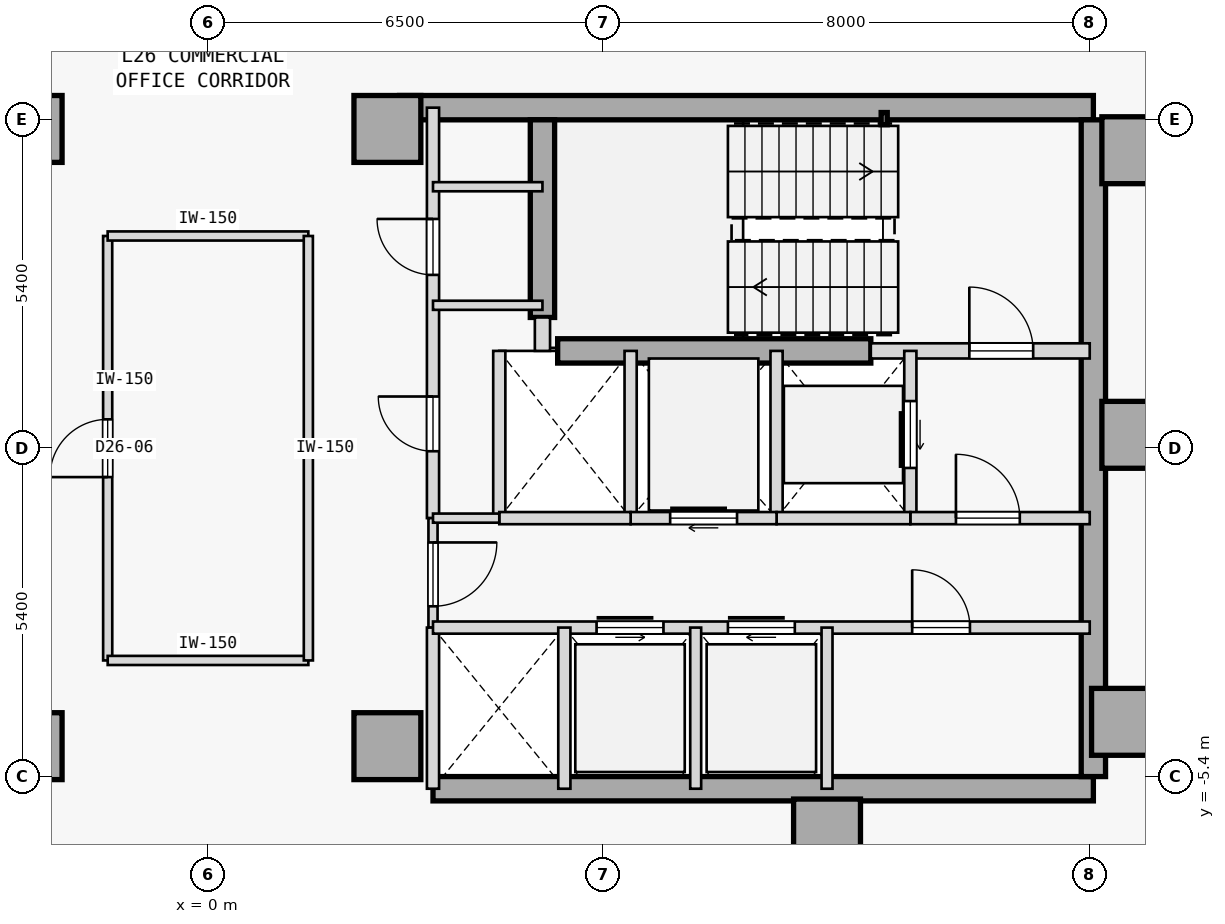
"""IFC4 building model, lengths in metres.
Left out: names, types, materials, properties, quantities, classifications, styles, units other than length and angle.
Written with IfcOpenShell. Run it as: python <this file> out.ifc"""

import sys

from ifc_helpers import new_model, si_unit, direction, frame, frame_2d, origin, origin_2d, place, context, subcontext, project, spatial, rectangle, hollow_rectangle, extrude, element, fill, save


model = new_model("IFC4")
c1 = context("Model", 3, precision=1e-05, world=origin(), true_north=direction((0.0, 1.0)))
c2 = subcontext(c1, "Body", "Model", "MODEL_VIEW")
j1 = project(units=[si_unit("LENGTHUNIT", "METRE"), si_unit("PLANEANGLEUNIT", "RADIAN")], contexts=[c1])
p1 = place(None, origin())
s1 = spatial("IfcSite", under=j1, at=p1, CompositionType="ELEMENT")
p2 = place(p1, origin())
s2 = spatial("IfcBuilding", under=s1, at=p2, CompositionType="ELEMENT")
p3 = place(p2, frame((0.0, 0.0, 105.9)))
s3 = spatial("IfcBuildingStorey", under=s2, at=p3, CompositionType="ELEMENT", Elevation=105.9)
for number, where, z_axis, x_axis in (
    (1, (-2.95, -4.9, 0.0), (0.0, 0.0, 1.0), (1.0, 0.0, 0.0)),
    (2, (-2.95, 5.25, 0.0), (0.0, 0.0, 1.0), (1.0, 0.0, 0.0)),
    (3, (15.25, 4.9, 0.0), (0.0, 0.0, 1.0), (1.0, 0.0, 0.0)),
    (4, (15.25, 0.22, 0.0), (0.0, 0.0, 1.0), (1.0, 0.0, 0.0)),
    (5, (15.08, -4.5, 0.0), (0.0, 0.0, 1.0), (1.0, 0.0, 0.0)),
    (6, (10.18, -6.32, 0.0), (0.0, 0.0, 1.0), (1.0, 0.0, 0.0)),
    (7, (2.95, -4.9, 0.0), (0.0, 0.0, 1.0), (1.0, 0.0, 0.0)),
    (8, (2.95, 5.25, 0.0), (0.0, 0.0, 1.0), (1.0, 0.0, 0.0)),
):
    element("IfcColumn", number, at=place(p3, frame(where, z_axis=z_axis, x_axis=x_axis)), inside=s3, PredefinedType="COLUMN", context=c2, shape_type="SweptSolid", body=[
        extrude(rectangle(XDim=1.1, YDim=1.1, at=origin_2d()), origin(), (0.0, 0.0, 1.0), 3.7),
    ])
p4 = place(p3, frame((3.15, 5.6, 0.0), z_axis=(0.0, 0.0, 1.0), x_axis=(1.0, 0.0, 0.0)))
e9 = element("IfcWall", 9, at=p4, inside=s3, PredefinedType="SHEAR", context=c2, shape_type="SweptSolid", body=[
    extrude(rectangle(XDim=11.41, YDim=0.4, at=frame_2d((5.705, 0.0))), origin(), (0.0, 0.0, 1.0), 3.475),
])
p5 = place(p3, frame((3.7, -5.6, 0.0), z_axis=(0.0, 0.0, 1.0), x_axis=(1.0, 0.0, 0.0)))
e10 = element("IfcWall", 10, at=p5, inside=s3, PredefinedType="SHEAR", context=c2, shape_type="SweptSolid", body=[
    extrude(rectangle(XDim=10.86, YDim=0.4, at=frame_2d((5.43, 0.0))), origin(), (0.0, 0.0, 1.0), 3.475),
])
p6 = place(p3, frame((14.56, -5.4, 0.0), z_axis=(0.0, 0.0, 1.0), x_axis=(0.0, 1.0, 0.0)))
e11 = element("IfcWall", 11, at=p6, inside=s3, PredefinedType="SHEAR", context=c2, shape_type="SweptSolid", body=[
    extrude(rectangle(XDim=10.8, YDim=0.4, at=frame_2d((5.4, 0.0))), origin(), (0.0, 0.0, 1.0), 3.475),
])
p7 = place(p3, frame((5.5, 2.15, 0.0), z_axis=(0.0, 0.0, 1.0), x_axis=(0.0, 1.0, 0.0)))
e12 = element("IfcWall", 12, at=p7, inside=s3, PredefinedType="SHEAR", context=c2, shape_type="SweptSolid", body=[
    extrude(rectangle(XDim=3.25, YDim=0.4, at=frame_2d((1.625, 0.0))), origin(), (0.0, 0.0, 1.0), 3.475),
])
p8 = place(p3, frame((5.75, 1.6, 0.0), z_axis=(0.0, 0.0, 1.0), x_axis=(1.0, 0.0, 0.0)))
e13 = element("IfcWall", 13, at=p8, inside=s3, PredefinedType="SHEAR", context=c2, shape_type="SweptSolid", body=[
    extrude(rectangle(XDim=5.15, YDim=0.4, at=frame_2d((2.575, 0.0))), origin(), (0.0, 0.0, 1.0), 3.475),
])
p9 = place(p3, frame((11.12, 5.42, 0.0), z_axis=(0.0, 0.0, 1.0), x_axis=(1.0, 0.0, 0.0)))
e14 = element("IfcColumn", 14, at=p9, inside=s3, PredefinedType="COLUMN", context=c2, shape_type="SweptSolid", body=[
    extrude(hollow_rectangle(XDim=0.1, YDim=0.2, WallThickness=0.008, at=origin_2d()), origin(), (0.0, 0.0, 1.0), 3.7),
])
p10 = place(p3, frame((10.9, 1.6, 0.0), z_axis=(0.0, 0.0, 1.0), x_axis=(1.0, 0.0, 0.0)))
e15 = element("IfcWall", 15, at=p10, inside=s3, PredefinedType="STANDARD", context=c2, shape_type="SweptSolid", body=[
    extrude(rectangle(XDim=3.6, YDim=0.25, at=frame_2d((1.8, 0.0))), origin(), (0.0, 0.0, 1.0), 3.475),
])
p11 = place(p10, frame((1.62, 0.0, 0.0)))
e16 = element("IfcOpeningElement", 16, at=p11, cuts=e15, PredefinedType="OPENING", context=c2, shape_type="SweptSolid", body=[
    extrude(rectangle(XDim=1.05, YDim=2.15, at=frame_2d((0.525, 1.075))), frame((0.0, 0.135, 0.0), z_axis=(0.0, -1.0, 0.0), x_axis=(1.0, 0.0, 0.0)), (0.0, 0.0, 1.0), 0.27),
])
p12 = place(p3, frame((5.5, 1.6, 0.0), z_axis=(0.0, 0.0, 1.0), x_axis=(0.0, 1.0, 0.0)))
e17 = element("IfcWall", 17, at=p12, inside=s3, PredefinedType="STANDARD", context=c2, shape_type="SweptSolid", body=[
    extrude(rectangle(XDim=0.55, YDim=0.25, at=frame_2d((0.275, 0.0))), origin(), (0.0, 0.0, 1.0), 3.475),
])
p13 = place(p3, frame((3.7, -1.15, 0.0), z_axis=(0.0, 0.0, 1.0), x_axis=(0.0, 1.0, 0.0)))
e18 = element("IfcWall", 18, at=p13, inside=s3, PredefinedType="STANDARD", context=c2, shape_type="SweptSolid", body=[
    extrude(rectangle(XDim=6.75, YDim=0.2, at=frame_2d((3.375, 0.0))), origin(), (0.0, 0.0, 1.0), 3.475),
])
p14 = place(p13, frame((1.1, 0.0, 0.0)))
e19 = element("IfcOpeningElement", 19, at=p14, cuts=e18, PredefinedType="OPENING", context=c2, shape_type="SweptSolid", body=[
    extrude(rectangle(XDim=0.9, YDim=2.15, at=frame_2d((0.45, 1.075))), frame((0.0, 0.11, 0.0), z_axis=(0.0, -1.0, 0.0), x_axis=(1.0, 0.0, 0.0)), (0.0, 0.0, 1.0), 0.22),
])
p15 = place(p13, frame((4.0, 0.0, 0.0)))
e20 = element("IfcOpeningElement", 20, at=p15, cuts=e18, PredefinedType="OPENING", context=c2, shape_type="SweptSolid", body=[
    extrude(rectangle(XDim=0.92, YDim=2.15, at=frame_2d((0.46, 1.075))), frame((0.0, 0.11, 0.0), z_axis=(0.0, -1.0, 0.0), x_axis=(1.0, 0.0, 0.0)), (0.0, 0.0, 1.0), 0.22),
])
p16 = place(p3, frame((3.7, -2.95, 0.0), z_axis=(0.0, 0.0, 1.0), x_axis=(0.0, 1.0, 0.0)))
e21 = element("IfcWall", 21, at=p16, inside=s3, PredefinedType="PARTITIONING", context=c2, shape_type="SweptSolid", body=[
    extrude(rectangle(XDim=1.8, YDim=0.15, at=frame_2d((0.9, 0.0))), origin(), (0.0, 0.0, 1.0), 3.475),
])
p17 = place(p16, frame((0.35, 0.0, 0.0)))
e22 = element("IfcOpeningElement", 22, at=p17, cuts=e21, PredefinedType="OPENING", context=c2, shape_type="SweptSolid", body=[
    extrude(rectangle(XDim=1.05, YDim=2.18, at=frame_2d((0.525, 1.09))), frame((0.0, 0.085, 0.0), z_axis=(0.0, -1.0, 0.0), x_axis=(1.0, 0.0, 0.0)), (0.0, 0.0, 1.0), 0.17),
])
p18 = place(p3, frame((3.7, -5.6, 0.0), z_axis=(0.0, 0.0, 1.0), x_axis=(0.0, 1.0, 0.0)))
e23 = element("IfcWall", 23, at=p18, inside=s3, PredefinedType="STANDARD", context=c2, shape_type="SweptSolid", body=[
    extrude(rectangle(XDim=2.65, YDim=0.2, at=frame_2d((1.325, 0.0))), origin(), (0.0, 0.0, 1.0), 3.475),
])
p19 = place(p3, frame((11.55, -1.15, 0.0), z_axis=(0.0, 0.0, 1.0), x_axis=(0.0, 1.0, 0.0)))
e24 = element("IfcWall", 24, at=p19, inside=s3, PredefinedType="STANDARD", context=c2, shape_type="SweptSolid", body=[
    extrude(rectangle(XDim=2.75, YDim=0.2, at=frame_2d((1.375, 0.0))), origin(), (0.0, 0.0, 1.0), 3.475),
])
p20 = place(p19, frame((0.825, 0.0, 0.0)))
e25 = element("IfcOpeningElement", 25, at=p20, cuts=e24, PredefinedType="OPENING", context=c2, shape_type="SweptSolid", body=[
    extrude(rectangle(XDim=1.1, YDim=2.15, at=frame_2d((0.55, 1.075))), frame((0.0, 0.11, 0.0), z_axis=(0.0, -1.0, 0.0), x_axis=(1.0, 0.0, 0.0)), (0.0, 0.0, 1.0), 0.22),
])
p21 = place(p3, frame((9.35, -1.15, 0.0), z_axis=(0.0, 0.0, 1.0), x_axis=(0.0, 1.0, 0.0)))
e26 = element("IfcWall", 26, at=p21, inside=s3, PredefinedType="STANDARD", context=c2, shape_type="SweptSolid", body=[
    extrude(rectangle(XDim=2.75, YDim=0.2, at=frame_2d((1.375, 0.0))), origin(), (0.0, 0.0, 1.0), 3.475),
])
p22 = place(p3, frame((11.55, -1.15, 0.0), z_axis=(0.0, 0.0, 1.0), x_axis=(1.0, 0.0, 0.0)))
e27 = element("IfcWall", 27, at=p22, inside=s3, PredefinedType="STANDARD", context=c2, shape_type="SweptSolid", body=[
    extrude(rectangle(XDim=2.95, YDim=0.2, at=frame_2d((1.475, 0.0))), origin(), (0.0, 0.0, 1.0), 3.475),
])
p23 = place(p22, frame((0.75, 0.0, 0.0)))
e28 = element("IfcOpeningElement", 28, at=p23, cuts=e27, PredefinedType="OPENING", context=c2, shape_type="SweptSolid", body=[
    extrude(rectangle(XDim=1.05, YDim=2.18, at=frame_2d((0.525, 1.09))), frame((0.0, 0.11, 0.0), z_axis=(0.0, -1.0, 0.0), x_axis=(1.0, 0.0, 0.0)), (0.0, 0.0, 1.0), 0.22),
])
p24 = place(p3, frame((9.35, -1.15, 0.0), z_axis=(0.0, 0.0, 1.0), x_axis=(1.0, 0.0, 0.0)))
e29 = element("IfcWall", 29, at=p24, inside=s3, PredefinedType="STANDARD", context=c2, shape_type="SweptSolid", body=[
    extrude(rectangle(XDim=2.2, YDim=0.2, at=frame_2d((1.1, 0.0))), origin(), (0.0, 0.0, 1.0), 3.475),
])
p25 = place(p3, frame((6.95, -1.15, 0.0), z_axis=(0.0, 0.0, 1.0), x_axis=(0.0, 1.0, 0.0)))
e30 = element("IfcWall", 30, at=p25, inside=s3, PredefinedType="STANDARD", context=c2, shape_type="SweptSolid", body=[
    extrude(rectangle(XDim=2.75, YDim=0.2, at=frame_2d((1.375, 0.0))), origin(), (0.0, 0.0, 1.0), 3.475),
])
p26 = place(p3, frame((6.95, -1.15, 0.0), z_axis=(0.0, 0.0, 1.0), x_axis=(1.0, 0.0, 0.0)))
e31 = element("IfcWall", 31, at=p26, inside=s3, PredefinedType="STANDARD", context=c2, shape_type="SweptSolid", body=[
    extrude(rectangle(XDim=2.4, YDim=0.2, at=frame_2d((1.2, 0.0))), origin(), (0.0, 0.0, 1.0), 3.475),
])
p27 = place(p26, frame((0.65, 0.0, 0.0)))
e32 = element("IfcOpeningElement", 32, at=p27, cuts=e31, PredefinedType="OPENING", context=c2, shape_type="SweptSolid", body=[
    extrude(rectangle(XDim=1.1, YDim=2.15, at=frame_2d((0.55, 1.075))), frame((0.0, 0.11, 0.0), z_axis=(0.0, -1.0, 0.0), x_axis=(1.0, 0.0, 0.0)), (0.0, 0.0, 1.0), 0.22),
])
p28 = place(p3, frame((4.79, -1.15, 0.0), z_axis=(0.0, 0.0, 1.0), x_axis=(0.0, 1.0, 0.0)))
e33 = element("IfcWall", 33, at=p28, inside=s3, PredefinedType="STANDARD", context=c2, shape_type="SweptSolid", body=[
    extrude(rectangle(XDim=2.75, YDim=0.2, at=frame_2d((1.375, 0.0))), origin(), (0.0, 0.0, 1.0), 3.475),
])
p29 = place(p3, frame((4.79, -1.15, 0.0), z_axis=(0.0, 0.0, 1.0), x_axis=(1.0, 0.0, 0.0)))
e34 = element("IfcWall", 34, at=p29, inside=s3, PredefinedType="STANDARD", context=c2, shape_type="SweptSolid", body=[
    extrude(rectangle(XDim=2.16, YDim=0.2, at=frame_2d((1.08, 0.0))), origin(), (0.0, 0.0, 1.0), 3.475),
])
p30 = place(p3, frame((3.7, -1.15, 0.0), z_axis=(0.0, 0.0, 1.0), x_axis=(1.0, 0.0, 0.0)))
e35 = element("IfcWall", 35, at=p30, inside=s3, PredefinedType="PARTITIONING", context=c2, shape_type="SweptSolid", body=[
    extrude(rectangle(XDim=1.09, YDim=0.15, at=frame_2d((0.545, 0.0))), origin(), (0.0, 0.0, 1.0), 3.475),
])
p31 = place(p3, frame((3.7, -2.95, 0.0), z_axis=(0.0, 0.0, 1.0), x_axis=(1.0, 0.0, 0.0)))
e36 = element("IfcWall", 36, at=p31, inside=s3, PredefinedType="STANDARD", context=c2, shape_type="SweptSolid", body=[
    extrude(rectangle(XDim=10.8, YDim=0.2, at=frame_2d((5.4, 0.0))), origin(), (0.0, 0.0, 1.0), 3.475),
])
p32 = place(p31, frame((2.69, 0.0, 0.0)))
e37 = element("IfcOpeningElement", 37, at=p32, cuts=e36, PredefinedType="OPENING", context=c2, shape_type="SweptSolid", body=[
    extrude(rectangle(XDim=1.1, YDim=2.15, at=frame_2d((0.55, 1.075))), frame((0.0, 0.11, 0.0), z_axis=(0.0, -1.0, 0.0), x_axis=(1.0, 0.0, 0.0)), (0.0, 0.0, 1.0), 0.22),
])
p33 = place(p31, frame((4.85, 0.0, 0.0)))
e38 = element("IfcOpeningElement", 38, at=p33, cuts=e36, PredefinedType="OPENING", context=c2, shape_type="SweptSolid", body=[
    extrude(rectangle(XDim=1.1, YDim=2.15, at=frame_2d((0.55, 1.075))), frame((0.0, 0.11, 0.0), z_axis=(0.0, -1.0, 0.0), x_axis=(1.0, 0.0, 0.0)), (0.0, 0.0, 1.0), 0.22),
])
p34 = place(p31, frame((7.88, 0.0, 0.0)))
e39 = element("IfcOpeningElement", 39, at=p34, cuts=e36, PredefinedType="OPENING", context=c2, shape_type="SweptSolid", body=[
    extrude(rectangle(XDim=0.95, YDim=2.15, at=frame_2d((0.475, 1.075))), frame((0.0, 0.11, 0.0), z_axis=(0.0, -1.0, 0.0), x_axis=(1.0, 0.0, 0.0)), (0.0, 0.0, 1.0), 0.22),
])
p35 = place(p3, frame((5.86, -5.6, 0.0), z_axis=(0.0, 0.0, 1.0), x_axis=(0.0, 1.0, 0.0)))
e40 = element("IfcWall", 40, at=p35, inside=s3, PredefinedType="STANDARD", context=c2, shape_type="SweptSolid", body=[
    extrude(rectangle(XDim=2.65, YDim=0.2, at=frame_2d((1.325, 0.0))), origin(), (0.0, 0.0, 1.0), 3.475),
])
for number, where, z_axis, x_axis in (
    (41, (10.18, -5.6, 0.0), (0.0, 0.0, 1.0), (0.0, 1.0, 0.0)),
    (42, (8.02, -5.6, 0.0), (0.0, 0.0, 1.0), (0.0, 1.0, 0.0)),
):
    element("IfcWall", number, at=place(p3, frame(where, z_axis=z_axis, x_axis=x_axis)), inside=s3, PredefinedType="STANDARD", context=c2, shape_type="SweptSolid", body=[
        extrude(rectangle(XDim=2.65, YDim=0.18, at=frame_2d((1.325, 0.0))), origin(), (0.0, 0.0, 1.0), 3.475),
    ])
for number, where, z_axis, x_axis in (
    (43, (3.7, 4.3, 0.0), (0.0, 0.0, 1.0), (1.0, 0.0, 0.0)),
    (44, (3.7, 2.35, 0.0), (0.0, 0.0, 1.0), (1.0, 0.0, 0.0)),
):
    element("IfcWall", number, at=place(p3, frame(where, z_axis=z_axis, x_axis=x_axis)), inside=s3, PredefinedType="PARTITIONING", context=c2, shape_type="SweptSolid", body=[
        extrude(rectangle(XDim=1.8, YDim=0.15, at=frame_2d((0.9, 0.0))), origin(), (0.0, 0.0, 1.0), 3.475),
    ])
p36 = place(p3, frame((-1.65, -3.49, 0.0), z_axis=(0.0, 0.0, 1.0), x_axis=(-0.000104928124, 0.999999994495, 0.0)))
e45 = element("IfcWall", 45, at=p36, inside=s3, PredefinedType="PARTITIONING", context=c2, shape_type="SweptSolid", body=[
    extrude(rectangle(XDim=6.98, YDim=0.15, at=frame_2d((3.49, 0.0))), origin(), (0.0, 0.0, 1.0), 3.475),
])
p37 = place(p36, frame((3.015, 0.0, 0.0)))
e46 = element("IfcOpeningElement", 46, at=p37, cuts=e45, PredefinedType="OPENING", context=c2, shape_type="SweptSolid", body=[
    extrude(rectangle(XDim=0.95, YDim=2.15, at=frame_2d((0.475, 1.075))), frame((0.0, 0.085, 0.0), z_axis=(0.0, -1.0, 0.0), x_axis=(1.0, 0.0, 0.0)), (0.0, 0.0, 1.0), 0.17),
])
p38 = place(p3, frame((-1.65, -3.49, 0.0), z_axis=(0.0, 0.0, 1.0), x_axis=(1.0, 0.0, 0.0)))
e47 = element("IfcWall", 47, at=p38, inside=s3, PredefinedType="PARTITIONING", context=c2, shape_type="SweptSolid", body=[
    extrude(rectangle(XDim=3.3, YDim=0.15, at=frame_2d((1.65, 0.0))), origin(), (0.0, 0.0, 1.0), 3.475),
])
p39 = place(p3, frame((-1.65, 3.49, 0.0), z_axis=(0.0, 0.0, 1.0), x_axis=(1.0, 0.0, 0.0)))
e48 = element("IfcWall", 48, at=p39, inside=s3, PredefinedType="PARTITIONING", context=c2, shape_type="SweptSolid", body=[
    extrude(rectangle(XDim=3.3, YDim=0.15, at=frame_2d((1.65, 0.0))), origin(), (0.0, 0.0, 1.0), 3.475),
])
p40 = place(p3, frame((1.65, -3.49, 0.0), z_axis=(0.0, 0.0, 1.0), x_axis=(-6.9952083e-05, 0.999999997553, 0.0)))
e49 = element("IfcWall", 49, at=p40, inside=s3, PredefinedType="PARTITIONING", context=c2, shape_type="SweptSolid", body=[
    extrude(rectangle(XDim=6.98, YDim=0.15, at=frame_2d((3.49, 0.0))), origin(), (0.0, 0.0, 1.0), 3.475),
])
p41 = place(p11, origin())
e50 = element("IfcDoor", 50, at=p41, inside=s3, OperationType="SINGLE_SWING_LEFT", PredefinedType="DOOR", context=c2, shape_type="SweptSolid", body=[
    extrude(rectangle(XDim=1.05, YDim=2.15, at=frame_2d((0.525, 1.075))), frame((0.0, 0.025, 0.0), z_axis=(0.0, -1.0, 0.0), x_axis=(1.0, 0.0, 0.0)), (0.0, 0.0, 1.0), 0.05),
])
fill(e16, e50)
p42 = place(p23, origin())
e51 = element("IfcDoor", 51, at=p42, inside=s3, OperationType="SINGLE_SWING_LEFT", PredefinedType="DOOR", context=c2, shape_type="SweptSolid", body=[
    extrude(rectangle(XDim=1.05, YDim=2.18, at=frame_2d((0.525, 1.09))), frame((0.0, 0.025, 0.0), z_axis=(0.0, -1.0, 0.0), x_axis=(1.0, 0.0, 0.0)), (0.0, 0.0, 1.0), 0.05),
])
fill(e28, e51)
p43 = place(p17, frame((1.05, 0.0, 0.0), z_axis=(0.0, 0.0, 1.0), x_axis=(-1.0, 0.0, 0.0)))
e52 = element("IfcDoor", 52, at=p43, inside=s3, OperationType="SINGLE_SWING_RIGHT", PredefinedType="DOOR", context=c2, shape_type="SweptSolid", body=[
    extrude(rectangle(XDim=1.05, YDim=2.18, at=frame_2d((0.525, 1.09))), frame((0.0, 0.025, 0.0), z_axis=(0.0, -1.0, 0.0), x_axis=(1.0, 0.0, 0.0)), (0.0, 0.0, 1.0), 0.05),
])
fill(e22, e52)
p44 = place(p20, origin())
e53 = element("IfcDoor", 53, at=p44, inside=s3, OperationType="SLIDING_TO_RIGHT", PredefinedType="DOOR", context=c2, shape_type="SweptSolid", body=[
    extrude(rectangle(XDim=1.1, YDim=2.15, at=frame_2d((0.55, 1.075))), frame((0.0, 0.025, 0.0), z_axis=(0.0, -1.0, 0.0), x_axis=(1.0, 0.0, 0.0)), (0.0, 0.0, 1.0), 0.05),
])
fill(e25, e53)
p45 = place(p27, origin())
e54 = element("IfcDoor", 54, at=p45, inside=s3, OperationType="SLIDING_TO_RIGHT", PredefinedType="DOOR", context=c2, shape_type="SweptSolid", body=[
    extrude(rectangle(XDim=1.1, YDim=2.15, at=frame_2d((0.55, 1.075))), frame((0.0, 0.025, 0.0), z_axis=(0.0, -1.0, 0.0), x_axis=(1.0, 0.0, 0.0)), (0.0, 0.0, 1.0), 0.05),
])
fill(e32, e54)
p46 = place(p32, origin())
e55 = element("IfcDoor", 55, at=p46, inside=s3, OperationType="SLIDING_TO_LEFT", PredefinedType="DOOR", context=c2, shape_type="SweptSolid", body=[
    extrude(rectangle(XDim=1.1, YDim=2.15, at=frame_2d((0.55, 1.075))), frame((0.0, 0.025, 0.0), z_axis=(0.0, -1.0, 0.0), x_axis=(1.0, 0.0, 0.0)), (0.0, 0.0, 1.0), 0.05),
])
fill(e37, e55)
p47 = place(p33, origin())
e56 = element("IfcDoor", 56, at=p47, inside=s3, OperationType="SLIDING_TO_RIGHT", PredefinedType="DOOR", context=c2, shape_type="SweptSolid", body=[
    extrude(rectangle(XDim=1.1, YDim=2.15, at=frame_2d((0.55, 1.075))), frame((0.0, 0.025, 0.0), z_axis=(0.0, -1.0, 0.0), x_axis=(1.0, 0.0, 0.0)), (0.0, 0.0, 1.0), 0.05),
])
fill(e38, e56)
p48 = place(p34, origin())
e57 = element("IfcDoor", 57, at=p48, inside=s3, OperationType="SINGLE_SWING_LEFT", PredefinedType="DOOR", context=c2, shape_type="SweptSolid", body=[
    extrude(rectangle(XDim=0.95, YDim=2.15, at=frame_2d((0.475, 1.075))), frame((0.0, 0.025, 0.0), z_axis=(0.0, -1.0, 0.0), x_axis=(1.0, 0.0, 0.0)), (0.0, 0.0, 1.0), 0.05),
])
fill(e39, e57)
p49 = place(p14, origin())
e58 = element("IfcDoor", 58, at=p49, inside=s3, OperationType="SINGLE_SWING_RIGHT", PredefinedType="DOOR", context=c2, shape_type="SweptSolid", body=[
    extrude(rectangle(XDim=0.9, YDim=2.15, at=frame_2d((0.45, 1.075))), frame((0.0, 0.025, 0.0), z_axis=(0.0, -1.0, 0.0), x_axis=(1.0, 0.0, 0.0)), (0.0, 0.0, 1.0), 0.05),
])
fill(e19, e58)
p50 = place(p15, origin())
e59 = element("IfcDoor", 59, at=p50, inside=s3, OperationType="SINGLE_SWING_RIGHT", PredefinedType="DOOR", context=c2, shape_type="SweptSolid", body=[
    extrude(rectangle(XDim=0.92, YDim=2.15, at=frame_2d((0.46, 1.075))), frame((0.0, 0.025, 0.0), z_axis=(0.0, -1.0, 0.0), x_axis=(1.0, 0.0, 0.0)), (0.0, 0.0, 1.0), 0.05),
])
fill(e20, e59)
p51 = place(p37, origin())
e60 = element("IfcDoor", 60, at=p51, inside=s3, OperationType="SINGLE_SWING_LEFT", PredefinedType="DOOR", context=c2, shape_type="SweptSolid", body=[
    extrude(rectangle(XDim=0.95, YDim=2.15, at=frame_2d((0.475, 1.075))), frame((0.0, 0.025, 0.0), z_axis=(0.0, -1.0, 0.0), x_axis=(1.0, 0.0, 0.0)), (0.0, 0.0, 1.0), 0.05),
])
fill(e46, e60)
save(model, sys.argv[1])
